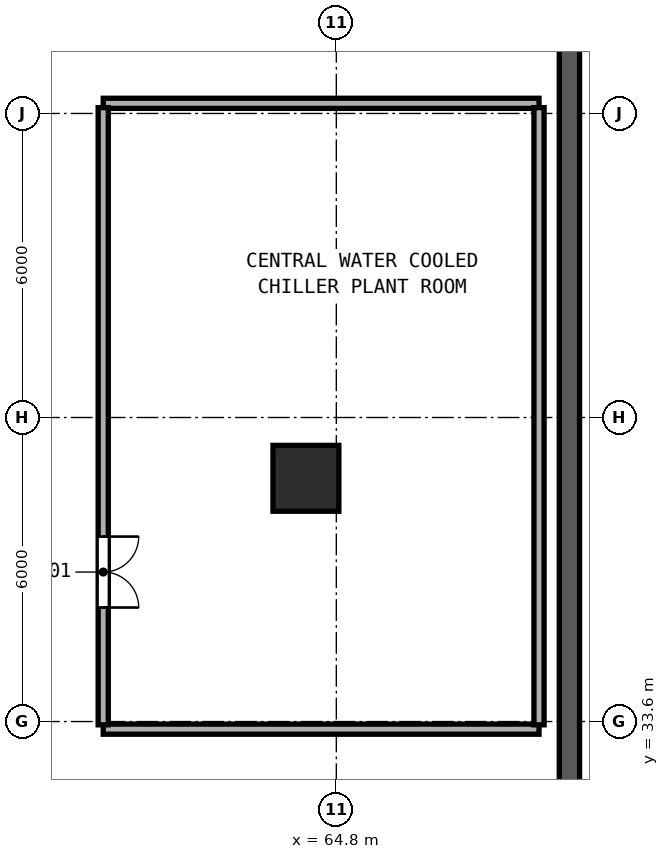
"""IFC4 building model, lengths in metres.
Left out: names, types, materials, properties, quantities, classifications, styles, units other than length and angle.
Written with IfcOpenShell. Run it as: python <this file> out.ifc"""

import sys

from ifc_helpers import new_model, si_unit, direction, frame, frame_2d, origin, origin_2d, place, context, subcontext, project, spatial, rectangle, hollow_rectangle, extrude, element, fill, save


model = new_model("IFC4")
c1 = context("Model", 3, precision=1e-05, world=origin(), true_north=direction((0.0, 1.0)))
c2 = subcontext(c1, "Body", "Model", "MODEL_VIEW")
j1 = project(units=[si_unit("LENGTHUNIT", "METRE"), si_unit("PLANEANGLEUNIT", "RADIAN")], contexts=[c1])
p1 = place(None, origin())
s1 = spatial("IfcSite", under=j1, at=p1, CompositionType="ELEMENT")
p2 = place(p1, origin())
s2 = spatial("IfcBuilding", under=s1, at=p2, CompositionType="ELEMENT")
p3 = place(p2, frame((0.0, 0.0, -9.6)))
s3 = spatial("IfcBuildingStorey", under=s2, at=p3, CompositionType="ELEMENT", Elevation=-9.6)
p4 = place(p3, frame((69.4, 10.5, 0.0), z_axis=(0.0, 0.0, 1.0), x_axis=(0.0, 1.0, 0.0)))
e1 = element("IfcWall", 1, at=p4, inside=s3, PredefinedType="SOLIDWALL", context=c2, shape_type="SweptSolid", body=[
    extrude(rectangle(XDim=36.5, YDim=0.4, at=frame_2d((18.25, 0.0))), origin(), (0.0, 0.0, 1.0), 4.52),
])
p5 = place(p3, frame((64.2, 38.4, 0.0), z_axis=(0.0, 0.0, 1.0), x_axis=(1.0, 0.0, 0.0)))
e2 = element("IfcColumn", 2, at=p5, inside=s3, PredefinedType="COLUMN", context=c2, shape_type="SweptSolid", body=[
    extrude(hollow_rectangle(XDim=1.3, YDim=1.3, WallThickness=0.048, at=origin_2d()), origin(), (0.0, 0.0, 1.0), 4.8),
])
for number, where, z_axis, x_axis in (
    (3, (60.2, 45.8, 0.0), (0.0, 0.0, 1.0), (1.0, 0.0, 0.0)),
    (4, (60.2, 33.45, 0.0), (0.0, 0.0, 1.0), (1.0, 0.0, 0.0)),
):
    element("IfcWall", number, at=place(p3, frame(where, z_axis=z_axis, x_axis=x_axis)), inside=s3, PredefinedType="SOLIDWALL", context=c2, shape_type="SweptSolid", body=[
        extrude(rectangle(XDim=8.6, YDim=0.2, at=frame_2d((4.3, 0.0))), origin(), (0.0, 0.0, 1.0), 4.52),
    ])
p6 = place(p3, frame((60.2, 33.535, 0.0), z_axis=(0.0, 0.0, 1.0), x_axis=(0.0, 1.0, 0.0)))
e5 = element("IfcWall", 5, at=p6, inside=s3, PredefinedType="SOLIDWALL", context=c2, shape_type="SweptSolid", body=[
    extrude(rectangle(XDim=12.18, YDim=0.2, at=frame_2d((6.09, 0.0))), origin(), (0.0, 0.0, 1.0), 4.52),
])
p7 = place(p6, frame((3.715, 0.0, 0.0), z_axis=(0.0, 0.0, 1.0), x_axis=(-1.0, 0.0, 0.0)))
e6 = element("IfcOpeningElement", 6, at=p7, cuts=e5, PredefinedType="OPENING", context=c2, shape_type="SweptSolid", body=[
    extrude(rectangle(XDim=1.4, YDim=2.2, at=frame_2d((0.7, 1.1))), frame((0.0, 0.11, 0.0), z_axis=(0.0, -1.0, 0.0), x_axis=(1.0, 0.0, 0.0)), (0.0, 0.0, 1.0), 0.22),
])
p8 = place(p3, frame((68.8, 33.535, 0.0), z_axis=(0.0, 0.0, 1.0), x_axis=(0.0, 1.0, 0.0)))
e7 = element("IfcWall", 7, at=p8, inside=s3, PredefinedType="SOLIDWALL", context=c2, shape_type="SweptSolid", body=[
    extrude(rectangle(XDim=12.18, YDim=0.2, at=frame_2d((6.09, 0.0))), origin(), (0.0, 0.0, 1.0), 4.52),
])
p9 = place(p7, origin())
e8 = element("IfcDoor", 8, at=p9, inside=s3, OperationType="DOUBLE_DOOR_SINGLE_SWING", PredefinedType="DOOR", context=c2, shape_type="SweptSolid", body=[
    extrude(rectangle(XDim=1.4, YDim=2.2, at=frame_2d((0.7, 1.1))), frame((0.0, 0.025, 0.0), z_axis=(0.0, -1.0, 0.0), x_axis=(1.0, 0.0, 0.0)), (0.0, 0.0, 1.0), 0.05),
])
fill(e6, e8)
save(model, sys.argv[1])
